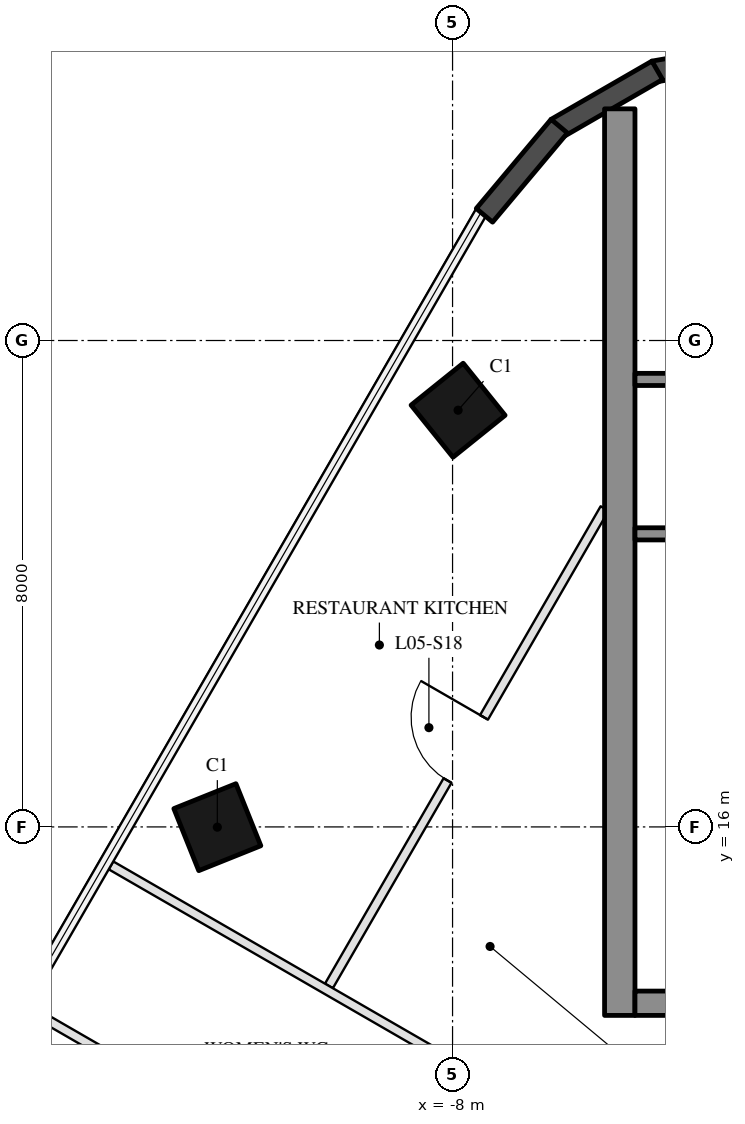
"""IFC4 building model, lengths in metres.
Left out: names, types, materials, properties, quantities, classifications, styles, units other than length and angle.
Written with IfcOpenShell. Run it as: python <this file> out.ifc"""

import sys

from ifc_helpers import new_model, si_unit, direction, frame, frame_2d, origin, origin_2d, place, context, subcontext, project, spatial, rectangle, hollow_rectangle, extrude, boolean, halfspace, element, fill, save


model = new_model("IFC4")
c1 = context("Model", 3, precision=1e-05, world=origin(), true_north=direction((0.0, 1.0)))
c2 = subcontext(c1, "Body", "Model", "MODEL_VIEW")
j1 = project(units=[si_unit("LENGTHUNIT", "METRE"), si_unit("PLANEANGLEUNIT", "RADIAN")], contexts=[c1])
p1 = place(None, origin())
s1 = spatial("IfcSite", under=j1, at=p1, CompositionType="ELEMENT")
p2 = place(p1, origin())
s2 = spatial("IfcBuilding", under=s1, at=p2, CompositionType="ELEMENT")
p3 = place(p2, frame((0.0, 0.0, 33.0)))
s3 = spatial("IfcBuildingStorey", under=s2, at=p3, CompositionType="ELEMENT", Elevation=33.0)
p4 = place(p3, frame((-7.909, 22.854, 0.0), z_axis=(0.004719641607, -0.012314467182, 0.999913035659), x_axis=(0.503343741395, 0.864046735596, 0.008265391899)))
e1 = element("IfcColumn", 1, at=p4, inside=s3, PredefinedType="COLUMN", context=c2, shape_type="SweptSolid", body=[
    boolean("DIFFERENCE", boolean("DIFFERENCE", extrude(hollow_rectangle(XDim=1.1, YDim=1.1, WallThickness=0.05, at=origin_2d()), origin(), (0.0, 0.0, 1.0), 4.5), halfspace(frame((0.0, 0.0, 0.012), z_axis=(0.0, 0.0, 1.0), x_axis=(1.0, 0.0, 0.0)), True)), halfspace(frame((0.0, 0.0, 4.493), z_axis=(0.0, 0.0, 1.0), x_axis=(1.0, 0.0, 0.0)), False)),
])
p5 = place(p3, frame((-11.868, 15.996, 0.0), z_axis=(0.006835520265, -0.008680025734, 0.999938964545), x_axis=(0.498767584387, 0.866726006756, 0.004114119219)))
e2 = element("IfcColumn", 2, at=p5, inside=s3, PredefinedType="COLUMN", context=c2, shape_type="SweptSolid", body=[
    boolean("DIFFERENCE", boolean("DIFFERENCE", extrude(hollow_rectangle(XDim=1.1, YDim=1.1, WallThickness=0.05, at=origin_2d()), origin(), (0.0, 0.0, 1.0), 4.5), halfspace(frame((0.0, 0.0, 0.01), z_axis=(0.0, 0.0, 1.0), x_axis=(1.0, 0.0, 0.0)), True)), halfspace(frame((0.0, 0.0, 4.494), z_axis=(0.0, 0.0, 1.0), x_axis=(1.0, 0.0, 0.0)), False)),
])
for number, where, z_axis, x_axis in (
    (3, (-2.805, 28.755, 0.0), (0.0, 0.0, 1.0), (-0.985, -0.174, 0.0)),
    (4, (-4.634, 28.444, 0.0), (0.0, 0.0, 1.0), (-0.866, -0.5, 0.0)),
    (5, (-6.245, 27.525, 0.0), (0.0, 0.0, 1.0), (-0.643, -0.766, 0.0)),
):
    element("IfcWall", number, at=place(p3, frame(where, z_axis=z_axis, x_axis=x_axis)), inside=s3, PredefinedType="SOLIDWALL", context=c2, shape_type="SweptSolid", body=[
        extrude(rectangle(XDim=1.915, YDim=0.35, at=frame_2d((0.957, 0.0))), origin(), (0.0, 0.0, 1.0), 4.2),
    ])
p6 = place(p3, frame((-5.25, 12.9, 0.0), z_axis=(0.0, 0.0, 1.0), x_axis=(0.0, 1.0, 0.0)))
e6 = element("IfcWall", 6, at=p6, inside=s3, PredefinedType="SHEAR", context=c2, shape_type="SweptSolid", body=[
    extrude(rectangle(XDim=14.91, YDim=0.5, at=frame_2d((7.455, 0.0))), origin(), (0.0, 0.0, 1.0), 4.2),
])
p7 = place(p3, frame((5.0, 13.1, 0.0), z_axis=(0.0, 0.0, 1.0), x_axis=(-1.0, 0.0, 0.0)))
e7 = element("IfcWall", 7, at=p7, inside=s3, PredefinedType="SHEAR", context=c2, shape_type="SweptSolid", body=[
    extrude(rectangle(XDim=10.0, YDim=0.4, at=frame_2d((5.0, 0.0))), origin(), (0.0, 0.0, 1.0), 4.2),
])
p8 = place(p7, frame((3.55, 0.0, 0.0)))
e8 = element("IfcOpeningElement", 8, at=p8, cuts=e7, PredefinedType="OPENING", context=c2, shape_type="SweptSolid", body=[
    extrude(rectangle(XDim=1.1, YDim=2.1, at=frame_2d((0.55, 1.05))), frame((0.0, 0.21, 0.0), z_axis=(0.0, -1.0, 0.0), x_axis=(1.0, 0.0, 0.0)), (0.0, 0.0, 1.0), 0.42),
])
p9 = place(p7, frame((5.85, 0.0, 0.0)))
e9 = element("IfcOpeningElement", 9, at=p9, cuts=e7, PredefinedType="OPENING", context=c2, shape_type="SweptSolid", body=[
    extrude(rectangle(XDim=1.4, YDim=2.1, at=frame_2d((0.7, 1.05))), frame((0.0, 0.21, 0.0), z_axis=(0.0, -1.0, 0.0), x_axis=(1.0, 0.0, 0.0)), (0.0, 0.0, 1.0), 0.42),
])
for number, where, z_axis, x_axis in (
    (10, (-3.0, 20.82, 0.0), (0.0, 0.0, 1.0), (-1.0, 0.0, 0.0)),
    (11, (-3.0, 23.36, 0.0), (0.0, 0.0, 1.0), (-1.0, 0.0, 0.0)),
):
    element("IfcWall", number, at=place(p3, frame(where, z_axis=z_axis, x_axis=x_axis)), inside=s3, PredefinedType="SHEAR", context=c2, shape_type="SweptSolid", body=[
        extrude(rectangle(XDim=2.0, YDim=0.2, at=frame_2d((1.0, 0.0))), origin(), (0.0, 0.0, 1.0), 4.2),
    ])
p10 = place(p3, frame((-5.5, 21.236, 0.0), z_axis=(0.0, 0.0, 1.0), x_axis=(-0.499999852422, -0.866025488988, 0.0)))
e12 = element("IfcWall", 12, at=p10, inside=s3, PredefinedType="PARTITIONING", context=c2, shape_type="SweptSolid", body=[
    extrude(rectangle(XDim=9.066, YDim=0.15, at=frame_2d((4.533, 0.0))), origin(), (0.0, 0.0, 1.0), 3.51),
])
p11 = place(p10, frame((3.965, 0.0, 0.0)))
e13 = element("IfcOpeningElement", 13, at=p11, cuts=e12, PredefinedType="OPENING", context=c2, shape_type="SweptSolid", body=[
    extrude(rectangle(XDim=1.2, YDim=2.1, at=frame_2d((0.6, 1.05))), frame((0.0, 0.085, 0.0), z_axis=(0.0, -1.0, 0.0), x_axis=(1.0, 0.0, 0.0)), (0.0, 0.0, 1.0), 0.17),
])
p12 = place(p3, frame((-13.617, 15.367, 0.0), z_axis=(0.0, 0.0, 1.0), x_axis=(0.866027503583, -0.499996363024, 0.0)))
e14 = element("IfcWall", 14, at=p12, inside=s3, PredefinedType="PARTITIONING", context=c2, shape_type="SweptSolid", body=[
    extrude(rectangle(XDim=10.776, YDim=0.15, at=frame_2d((5.388, 0.0))), origin(), (0.0, 0.0, 1.0), 4.2),
])
p13 = place(p3, frame((-14.979, 13.007, 0.0), z_axis=(0.0, 0.0, 1.0), x_axis=(0.866019543016, -0.500010151011, 0.0)))
e15 = element("IfcWall", 15, at=p13, inside=s3, PredefinedType="PARTITIONING", context=c2, shape_type="SweptSolid", body=[
    extrude(rectangle(XDim=7.468, YDim=0.15, at=frame_2d((3.734, 0.0))), origin(), (0.0, 0.0, 1.0), 3.41),
])
p14 = place(p3, frame((-2.482, 12.9, 0.0), z_axis=(0.0, 0.0, 1.0), x_axis=(-0.50000478328, -0.866022642139, 0.0)))
e16 = element("IfcWall", 16, at=p14, inside=s3, PredefinedType="PARTITIONING", context=c2, shape_type="SweptSolid", body=[
    extrude(rectangle(XDim=19.861, YDim=0.2, at=frame_2d((9.931, 0.0))), origin(), (0.0, 0.0, 1.0), 3.41),
])
p15 = place(p14, frame((13.23, 0.0, 0.0)))
e17 = element("IfcOpeningElement", 17, at=p15, cuts=e16, PredefinedType="OPENING", context=c2, shape_type="SweptSolid", body=[
    extrude(rectangle(XDim=1.8, YDim=2.1, at=frame_2d((0.9, 1.05))), frame((0.0, 0.11, 0.0), z_axis=(0.0, -1.0, 0.0), x_axis=(1.0, 0.0, 0.0)), (0.0, 0.0, 1.0), 0.22),
])
p16 = place(p14, frame((0.667, 0.0, 0.0)))
e18 = element("IfcOpeningElement", 18, at=p16, cuts=e16, PredefinedType="OPENING", context=c2, shape_type="SweptSolid", body=[
    extrude(rectangle(XDim=1.0, YDim=2.1, at=frame_2d((0.5, 1.05))), frame((0.0, 0.11, 0.0), z_axis=(0.0, -1.0, 0.0), x_axis=(1.0, 0.0, 0.0)), (0.0, 0.0, 1.0), 0.22),
])
p17 = place(p14, frame((2.1, 0.0, 0.0)))
e19 = element("IfcOpeningElement", 19, at=p17, cuts=e16, PredefinedType="OPENING", context=c2, shape_type="SweptSolid", body=[
    extrude(rectangle(XDim=1.0, YDim=2.1, at=frame_2d((0.5, 1.05))), frame((0.0, 0.11, 0.0), z_axis=(0.0, -1.0, 0.0), x_axis=(1.0, 0.0, 0.0)), (0.0, 0.0, 1.0), 0.22),
])
p18 = place(p14, frame((17.49, 0.0, 0.0)))
e20 = element("IfcOpeningElement", 20, at=p18, cuts=e16, PredefinedType="OPENING", context=c2, shape_type="SweptSolid", body=[
    extrude(rectangle(XDim=1.2, YDim=2.1, at=frame_2d((0.6, 1.05))), frame((0.0, 0.11, 0.0), z_axis=(0.0, -1.0, 0.0), x_axis=(1.0, 0.0, 0.0)), (0.0, 0.0, 1.0), 0.22),
])
p19 = place(p14, frame((7.168, 0.0, 0.0)))
e21 = element("IfcOpeningElement", 21, at=p19, cuts=e16, PredefinedType="OPENING", context=c2, shape_type="SweptSolid", body=[
    extrude(rectangle(XDim=1.0, YDim=2.1, at=frame_2d((0.5, 1.05))), frame((0.0, 0.11, 0.0), z_axis=(0.0, -1.0, 0.0), x_axis=(1.0, 0.0, 0.0)), (0.0, 0.0, 1.0), 0.22),
])
p20 = place(p11, frame((1.2, 0.0, 0.0), z_axis=(0.0, 0.0, 1.0), x_axis=(-1.0, 0.0, 0.0)))
e22 = element("IfcDoor", 22, at=p20, inside=s3, OperationType="SINGLE_SWING_RIGHT", PredefinedType="DOOR", context=c2, shape_type="SweptSolid", body=[
    extrude(rectangle(XDim=1.2, YDim=2.1, at=frame_2d((0.6, 1.05))), frame((0.0, 0.025, 0.0), z_axis=(0.0, -1.0, 0.0), x_axis=(1.0, 0.0, 0.0)), (0.0, 0.0, 1.0), 0.05),
])
fill(e13, e22)
save(model, sys.argv[1])
